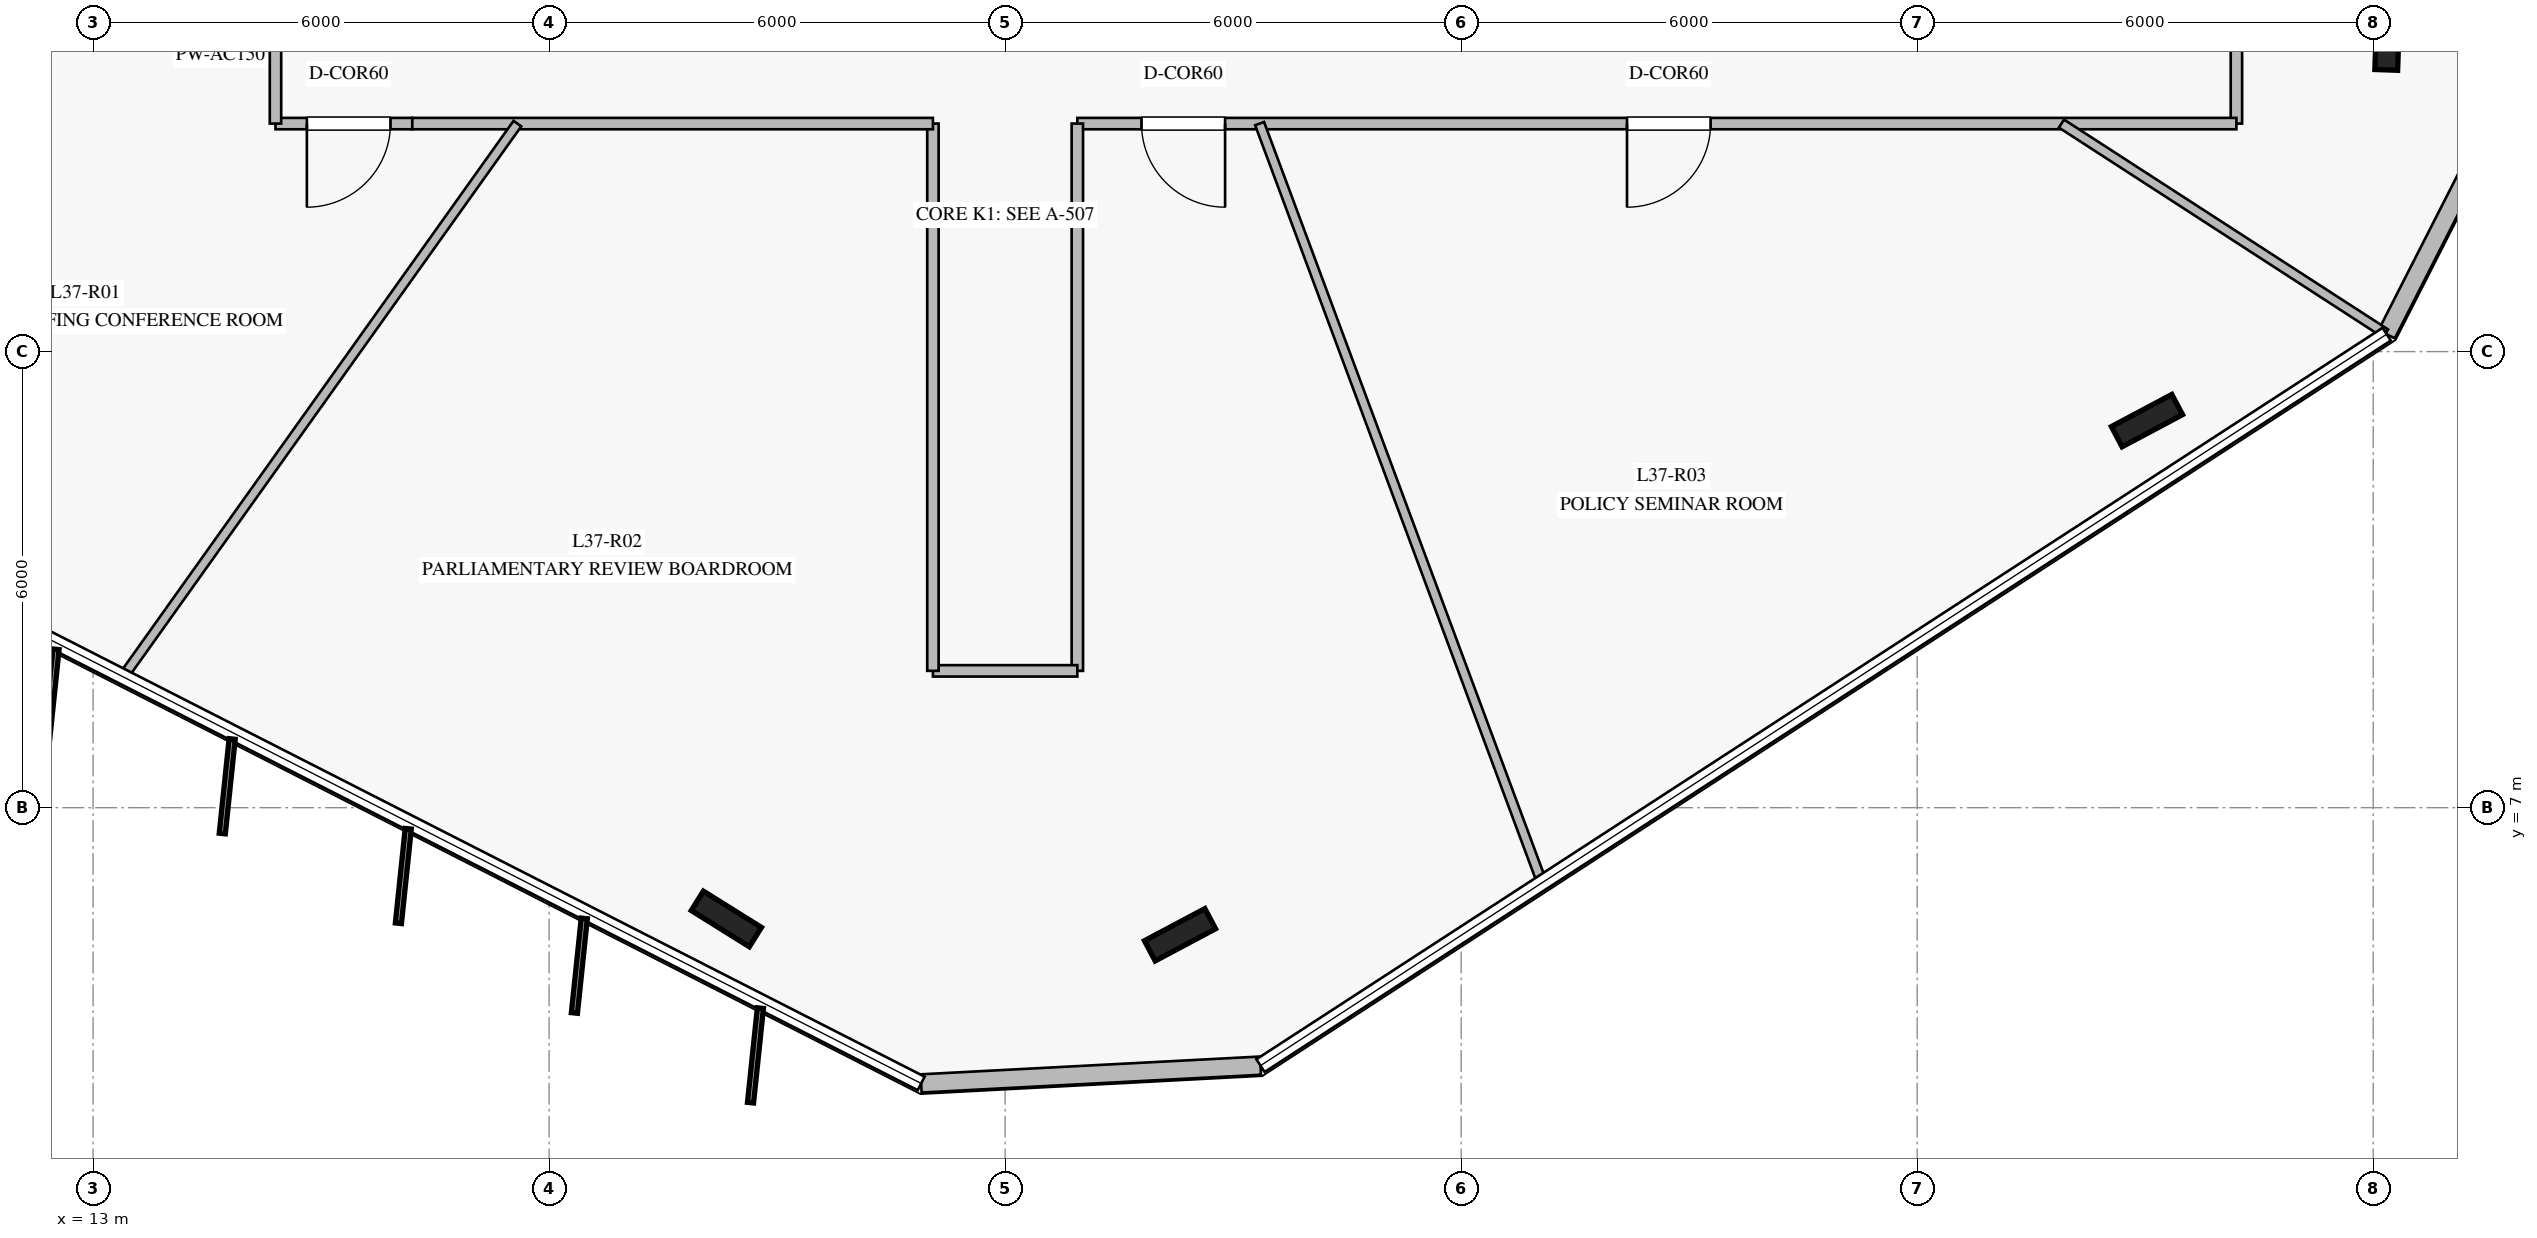
"""IFC4 building model, lengths in metres.
Left out: names, types, materials, properties, quantities, classifications, styles, units other than length and angle.
Written with IfcOpenShell. Run it as: python <this file> out.ifc"""

import sys

from ifc_helpers import new_model, si_unit, direction, frame, frame_2d, origin, origin_2d, place, context, subcontext, project, spatial, rectangle, i_section, extrude, element, fill, save


model = new_model("IFC4")
c1 = context("Model", 3, precision=1e-05, world=origin(), true_north=direction((0.0, 1.0)))
c2 = subcontext(c1, "Body", "Model", "MODEL_VIEW")
j1 = project(units=[si_unit("LENGTHUNIT", "METRE"), si_unit("PLANEANGLEUNIT", "RADIAN")], contexts=[c1])
p1 = place(None, origin())
s1 = spatial("IfcSite", under=j1, at=p1, CompositionType="ELEMENT")
p2 = place(p1, origin())
s2 = spatial("IfcBuilding", under=s1, at=p2, CompositionType="ELEMENT")
p3 = place(p2, frame((0.0, 0.0, 154.4)))
s3 = spatial("IfcBuildingStorey", under=s2, at=p3, CompositionType="ELEMENT", Elevation=154.4)
for number, where, z_axis, x_axis in (
    (1, (21.332, 5.536, 0.0), (0.0, 0.0, 1.0), (-0.848, 0.53, 0.0)),
    (2, (27.301, 5.328, 0.0), (0.0, 0.0, 1.0), (0.883, 0.469, 0.0)),
    (3, (40.023, 12.092, 0.0), (0.0, 0.0, 1.0), (0.883, 0.469, 0.0)),
):
    element("IfcColumn", number, at=place(p3, frame(where, z_axis=z_axis, x_axis=x_axis)), inside=s3, PredefinedType="COLUMN", context=c2, shape_type="SweptSolid", body=[
        extrude(i_section(OverallWidth=0.3, OverallDepth=0.9, WebThickness=0.019, FlangeThickness=0.035, at=origin_2d()), origin(), (0.0, 0.0, 1.0), 4.0),
    ])
p4 = place(p3, frame((23.895, 3.372, 0.0), z_axis=(0.0, 0.0, 1.0), x_axis=(0.998630920983, 0.052309498732, 0.0)))
e4 = element("IfcWall", 4, at=p4, inside=s3, PredefinedType="STANDARD", context=c2, shape_type="SweptSolid", body=[
    extrude(rectangle(XDim=4.471, YDim=0.24, at=frame_2d((2.236, 0.0))), origin(), (0.0, 0.0, 1.0), 3.76),
])
p5 = place(p3, frame((43.177, 13.229, 0.0), z_axis=(0.0, 0.0, 1.0), x_axis=(0.454103301767, 0.89094903969, 0.0)))
e5 = element("IfcWall", 5, at=p5, inside=s3, PredefinedType="STANDARD", context=c2, shape_type="SweptSolid", body=[
    extrude(rectangle(XDim=4.47, YDim=0.24, at=frame_2d((2.235, 0.0))), origin(), (0.0, 0.0, 1.0), 3.76),
])
p6 = place(p3, frame((17.2, 16.0, 0.0), z_axis=(0.0, 0.0, 1.0), x_axis=(-1.0, 0.0, 0.0)))
e6 = element("IfcWall", 6, at=p6, inside=s3, PredefinedType="PARTITIONING", context=c2, shape_type="SweptSolid", body=[
    extrude(rectangle(XDim=1.8, YDim=0.15, at=frame_2d((0.9, 0.0))), origin(), (0.0, 0.0, 1.0), 3.36),
])
p7 = place(p6, frame((0.287, 0.0, 0.0)))
e7 = element("IfcOpeningElement", 7, at=p7, cuts=e6, PredefinedType="OPENING", context=c2, shape_type="SweptSolid", body=[
    extrude(rectangle(XDim=1.1, YDim=2.2, at=frame_2d((0.55, 1.1))), frame((0.0, 0.085, 0.0), z_axis=(0.0, -1.0, 0.0), x_axis=(1.0, 0.0, 0.0)), (0.0, 0.0, 1.0), 0.17),
])
for number, where, z_axis, x_axis in (
    (8, (15.4, 16.0, 0.0), (0.0, 0.0, 1.0), (0.0, 1.0, 0.0)),
    (9, (41.2, 17.8, 0.0), (0.0, 0.0, 1.0), (0.0, -1.0, 0.0)),
):
    element("IfcWall", number, at=place(p3, frame(where, z_axis=z_axis, x_axis=x_axis)), inside=s3, PredefinedType="PARTITIONING", context=c2, shape_type="SweptSolid", body=[
        extrude(rectangle(XDim=1.8, YDim=0.15, at=frame_2d((0.9, 0.0))), origin(), (0.0, 0.0, 1.0), 3.21),
    ])
p8 = place(p3, frame((41.2, 16.0, 0.0), z_axis=(0.0, 0.0, 1.0), x_axis=(-1.0, 0.0, 0.0)))
e10 = element("IfcWall", 10, at=p8, inside=s3, PredefinedType="PARTITIONING", context=c2, shape_type="SweptSolid", body=[
    extrude(rectangle(XDim=15.25, YDim=0.15, at=frame_2d((7.625, 0.0))), origin(), (0.0, 0.0, 1.0), 3.21),
])
p9 = place(p8, frame((13.306, 0.0, 0.0)))
e11 = element("IfcOpeningElement", 11, at=p9, cuts=e10, PredefinedType="OPENING", context=c2, shape_type="SweptSolid", body=[
    extrude(rectangle(XDim=1.1, YDim=2.2, at=frame_2d((0.55, 1.1))), frame((0.0, 0.085, 0.0), z_axis=(0.0, -1.0, 0.0), x_axis=(1.0, 0.0, 0.0)), (0.0, 0.0, 1.0), 0.17),
])
p10 = place(p8, frame((6.918, 0.0, 0.0)))
e12 = element("IfcOpeningElement", 12, at=p10, cuts=e10, PredefinedType="OPENING", context=c2, shape_type="SweptSolid", body=[
    extrude(rectangle(XDim=1.1, YDim=2.2, at=frame_2d((0.55, 1.1))), frame((0.0, 0.085, 0.0), z_axis=(0.0, -1.0, 0.0), x_axis=(1.0, 0.0, 0.0)), (0.0, 0.0, 1.0), 0.17),
])
p11 = place(p3, frame((25.95, 16.0, 0.0), z_axis=(0.0, 0.0, 1.0), x_axis=(0.0, -1.0, 0.0)))
e13 = element("IfcWall", 13, at=p11, inside=s3, PredefinedType="PARTITIONING", context=c2, shape_type="SweptSolid", body=[
    extrude(rectangle(XDim=7.2, YDim=0.15, at=frame_2d((3.6, 0.0))), origin(), (0.0, 0.0, 1.0), 3.36),
])
p12 = place(p3, frame((25.95, 8.8, 0.0), z_axis=(0.0, 0.0, 1.0), x_axis=(-1.0, 0.0, 0.0)))
e14 = element("IfcWall", 14, at=p12, inside=s3, PredefinedType="PARTITIONING", context=c2, shape_type="SweptSolid", body=[
    extrude(rectangle(XDim=1.9, YDim=0.15, at=frame_2d((0.95, 0.0))), origin(), (0.0, 0.0, 1.0), 3.76),
])
p13 = place(p3, frame((24.05, 8.8, 0.0), z_axis=(0.0, 0.0, 1.0), x_axis=(0.0, 1.0, 0.0)))
e15 = element("IfcWall", 15, at=p13, inside=s3, PredefinedType="PARTITIONING", context=c2, shape_type="SweptSolid", body=[
    extrude(rectangle(XDim=7.2, YDim=0.15, at=frame_2d((3.6, 0.0))), origin(), (0.0, 0.0, 1.0), 3.36),
])
p14 = place(p3, frame((24.05, 16.0, 0.0), z_axis=(0.0, 0.0, 1.0), x_axis=(-1.0, 0.0, 0.0)))
e16 = element("IfcWall", 16, at=p14, inside=s3, PredefinedType="PARTITIONING", context=c2, shape_type="SweptSolid", body=[
    extrude(rectangle(XDim=6.85, YDim=0.15, at=frame_2d((3.425, 0.0))), origin(), (0.0, 0.0, 1.0), 3.21),
])
p15 = place(p3, frame((15.4, 20.093, 0.0), z_axis=(0.0, 0.0, 1.0), x_axis=(-0.890415643469, -0.45514830755, 0.0)))
e17 = element("IfcWall", 17, at=p15, inside=s3, PredefinedType="PARTITIONING", context=c2, shape_type="SweptSolid", body=[
    extrude(rectangle(XDim=10.856, YDim=0.125, at=frame_2d((5.428, 0.0))), origin(), (0.0, 0.0, 1.0), 3.16),
])
p16 = place(p3, frame((18.583, 16.0, 0.0), z_axis=(0.0, 0.0, 1.0), x_axis=(-0.580528659024, -0.814239814828, 0.0)))
e18 = element("IfcWall", 18, at=p16, inside=s3, PredefinedType="PARTITIONING", context=c2, shape_type="SweptSolid", body=[
    extrude(rectangle(XDim=8.921, YDim=0.125, at=frame_2d((4.46, 0.0))), origin(), (0.0, 0.0, 1.0), 3.16),
])
p17 = place(p3, frame((28.348, 16.0, 0.0), z_axis=(0.0, 0.0, 1.0), x_axis=(0.34871074409, -0.937230396944, 0.0)))
e19 = element("IfcWall", 19, at=p17, inside=s3, PredefinedType="PARTITIONING", context=c2, shape_type="SweptSolid", body=[
    extrude(rectangle(XDim=10.64, YDim=0.125, at=frame_2d((5.32, 0.0))), origin(), (0.0, 0.0, 1.0), 3.05),
])
p18 = place(p3, frame((38.898, 16.0, 0.0), z_axis=(0.0, 0.0, 1.0), x_axis=(0.839406365223, -0.543504327511, 0.0)))
e20 = element("IfcWall", 20, at=p18, inside=s3, PredefinedType="PARTITIONING", context=c2, shape_type="SweptSolid", body=[
    extrude(rectangle(XDim=5.08, YDim=0.125, at=frame_2d((2.54, 0.0))), origin(), (0.0, 0.0, 1.0), 3.16),
])
p19 = place(p7, origin())
e21 = element("IfcDoor", 21, at=p19, inside=s3, OperationType="SINGLE_SWING_RIGHT", PredefinedType="DOOR", context=c2, shape_type="SweptSolid", body=[
    extrude(rectangle(XDim=1.1, YDim=2.2, at=frame_2d((0.55, 1.1))), frame((0.0, 0.025, 0.0), z_axis=(0.0, -1.0, 0.0), x_axis=(1.0, 0.0, 0.0)), (0.0, 0.0, 1.0), 0.05),
])
fill(e7, e21)
p20 = place(p9, origin())
e22 = element("IfcDoor", 22, at=p20, inside=s3, OperationType="SINGLE_SWING_LEFT", PredefinedType="DOOR", context=c2, shape_type="SweptSolid", body=[
    extrude(rectangle(XDim=1.1, YDim=2.2, at=frame_2d((0.55, 1.1))), frame((0.0, 0.025, 0.0), z_axis=(0.0, -1.0, 0.0), x_axis=(1.0, 0.0, 0.0)), (0.0, 0.0, 1.0), 0.05),
])
fill(e11, e22)
p21 = place(p10, origin())
e23 = element("IfcDoor", 23, at=p21, inside=s3, OperationType="SINGLE_SWING_RIGHT", PredefinedType="DOOR", context=c2, shape_type="SweptSolid", body=[
    extrude(rectangle(XDim=1.1, YDim=2.2, at=frame_2d((0.55, 1.1))), frame((0.0, 0.025, 0.0), z_axis=(0.0, -1.0, 0.0), x_axis=(1.0, 0.0, 0.0)), (0.0, 0.0, 1.0), 0.05),
])
fill(e12, e23)
save(model, sys.argv[1])
